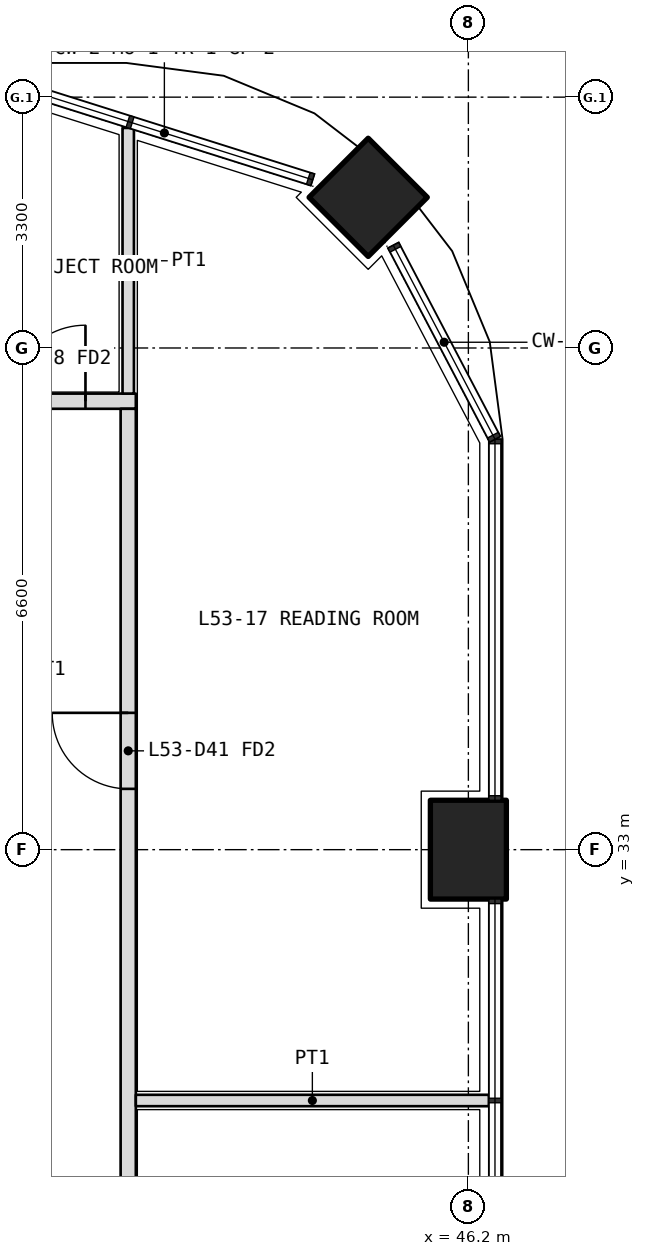
"""IFC4 building model, lengths in metres.
Left out: names, types, materials, properties, quantities, classifications, styles, units other than length and angle.
Written with IfcOpenShell. Run it as: python <this file> out.ifc"""

import sys

from ifc_helpers import new_model, si_unit, direction, frame, frame_2d, origin, origin_2d, place, context, subcontext, project, spatial, rectangle, extrude, element, fill, save


model = new_model("IFC4")
c1 = context("Model", 3, precision=1e-05, world=origin(), true_north=direction((0.0, 1.0)))
c2 = subcontext(c1, "Body", "Model", "MODEL_VIEW")
j1 = project(units=[si_unit("LENGTHUNIT", "METRE"), si_unit("PLANEANGLEUNIT", "RADIAN")], contexts=[c1])
p1 = place(None, origin())
s1 = spatial("IfcSite", under=j1, at=p1, CompositionType="ELEMENT")
p2 = place(p1, origin())
s2 = spatial("IfcBuilding", under=s1, at=p2, CompositionType="ELEMENT")
p3 = place(p2, frame((0.0, 0.0, 233.4)))
s3 = spatial("IfcBuildingStorey", under=s2, at=p3, CompositionType="ELEMENT", Elevation=233.4)
p4 = place(p3, frame((44.882, 41.582, 0.0), z_axis=(0.0, 0.0, 1.0), x_axis=(0.707106781187, 0.707106781187, 0.0)))
e1 = element("IfcColumn", 1, at=p4, inside=s3, PredefinedType="COLUMN", context=c2, shape_type="SweptSolid", body=[
    extrude(rectangle(XDim=1.1, YDim=1.1, at=origin_2d()), origin(), (0.0, 0.0, 1.0), 4.2),
])
p5 = place(p3, frame((46.2, 33.0, 0.0), z_axis=(0.0, 0.0, 1.0), x_axis=(0.0, 1.0, 0.0)))
e2 = element("IfcColumn", 2, at=p5, inside=s3, PredefinedType="COLUMN", context=c2, shape_type="SweptSolid", body=[
    extrude(rectangle(XDim=1.3, YDim=1.0, at=origin_2d()), origin(), (0.0, 0.0, 1.0), 4.2),
])
p6 = place(p3, frame((23.1, 38.9, 0.0), z_axis=(0.0, 0.0, 1.0), x_axis=(1.0, 0.0, 0.0)))
e3 = element("IfcWall", 3, at=p6, inside=s3, PredefinedType="PARTITIONING", context=c2, shape_type="SweptSolid", body=[
    extrude(rectangle(XDim=18.725, YDim=0.2, at=frame_2d((9.362, 0.0))), origin(), (0.0, 0.0, 1.0), 3.0),
])
p7 = place(p6, frame((4.45, 0.0, 0.0)))
e4 = element("IfcOpeningElement", 4, at=p7, cuts=e3, PredefinedType="OPENING", context=c2, shape_type="SweptSolid", body=[
    extrude(rectangle(XDim=1.0, YDim=2.1, at=frame_2d((0.5, 1.05))), frame((0.0, 0.11, 0.0), z_axis=(0.0, -1.0, 0.0), x_axis=(1.0, 0.0, 0.0)), (0.0, 0.0, 1.0), 0.22),
])
p8 = place(p6, frame((12.7, 0.0, 0.0)))
e5 = element("IfcOpeningElement", 5, at=p8, cuts=e3, PredefinedType="OPENING", context=c2, shape_type="SweptSolid", body=[
    extrude(rectangle(XDim=1.0, YDim=2.1, at=frame_2d((0.5, 1.05))), frame((0.0, 0.11, 0.0), z_axis=(0.0, -1.0, 0.0), x_axis=(1.0, 0.0, 0.0)), (0.0, 0.0, 1.0), 0.22),
])
p9 = place(p6, frame((17.062, 0.0, 0.0)))
e6 = element("IfcOpeningElement", 6, at=p9, cuts=e3, PredefinedType="OPENING", context=c2, shape_type="SweptSolid", body=[
    extrude(rectangle(XDim=1.0, YDim=2.1, at=frame_2d((0.5, 1.05))), frame((0.0, 0.11, 0.0), z_axis=(0.0, -1.0, 0.0), x_axis=(1.0, 0.0, 0.0)), (0.0, 0.0, 1.0), 0.22),
])
p10 = place(p3, frame((41.725, 7.4, 0.0), z_axis=(0.0, 0.0, 1.0), x_axis=(0.0, 1.0, 0.0)))
e7 = element("IfcWall", 7, at=p10, inside=s3, PredefinedType="PARTITIONING", context=c2, shape_type="SweptSolid", body=[
    extrude(rectangle(XDim=31.4, YDim=0.2, at=frame_2d((15.7, 0.0))), origin(), (0.0, 0.0, 1.0), 3.0),
])
p11 = place(p10, frame((5.65, 0.0, 0.0)))
e8 = element("IfcOpeningElement", 8, at=p11, cuts=e7, PredefinedType="OPENING", context=c2, shape_type="SweptSolid", body=[
    extrude(rectangle(XDim=1.0, YDim=2.1, at=frame_2d((0.5, 1.05))), frame((0.0, 0.11, 0.0), z_axis=(0.0, -1.0, 0.0), x_axis=(1.0, 0.0, 0.0)), (0.0, 0.0, 1.0), 0.22),
])
p12 = place(p10, frame((13.4, 0.0, 0.0)))
e9 = element("IfcOpeningElement", 9, at=p12, cuts=e7, PredefinedType="OPENING", context=c2, shape_type="SweptSolid", body=[
    extrude(rectangle(XDim=1.0, YDim=2.1, at=frame_2d((0.5, 1.05))), frame((0.0, 0.11, 0.0), z_axis=(0.0, -1.0, 0.0), x_axis=(1.0, 0.0, 0.0)), (0.0, 0.0, 1.0), 0.22),
])
p13 = place(p10, frame((16.75, 0.0, 0.0)))
e10 = element("IfcOpeningElement", 10, at=p13, cuts=e7, PredefinedType="OPENING", context=c2, shape_type="SweptSolid", body=[
    extrude(rectangle(XDim=0.9, YDim=2.1, at=frame_2d((0.45, 1.05))), frame((0.0, 0.11, 0.0), z_axis=(0.0, -1.0, 0.0), x_axis=(1.0, 0.0, 0.0)), (0.0, 0.0, 1.0), 0.22),
])
p14 = place(p10, frame((20.15, 0.0, 0.0)))
e11 = element("IfcOpeningElement", 11, at=p14, cuts=e7, PredefinedType="OPENING", context=c2, shape_type="SweptSolid", body=[
    extrude(rectangle(XDim=1.0, YDim=2.1, at=frame_2d((0.5, 1.05))), frame((0.0, 0.11, 0.0), z_axis=(0.0, -1.0, 0.0), x_axis=(1.0, 0.0, 0.0)), (0.0, 0.0, 1.0), 0.22),
])
p15 = place(p10, frame((26.4, 0.0, 0.0)))
e12 = element("IfcOpeningElement", 12, at=p15, cuts=e7, PredefinedType="OPENING", context=c2, shape_type="SweptSolid", body=[
    extrude(rectangle(XDim=1.0, YDim=2.1, at=frame_2d((0.5, 1.05))), frame((0.0, 0.11, 0.0), z_axis=(0.0, -1.0, 0.0), x_axis=(1.0, 0.0, 0.0)), (0.0, 0.0, 1.0), 0.22),
])
p16 = place(p3, frame((41.725, 42.495, 0.0), z_axis=(0.0, 0.0, 1.0), x_axis=(0.0, -1.0, 0.0)))
e13 = element("IfcWall", 13, at=p16, inside=s3, PredefinedType="PARTITIONING", context=c2, shape_type="SweptSolid", body=[
    extrude(rectangle(XDim=3.495, YDim=0.15, at=frame_2d((1.748, 0.0))), origin(), (0.0, 0.0, 1.0), 2.7),
])
p17 = place(p3, frame((46.47, 29.7, 0.0), z_axis=(0.0, 0.0, 1.0), x_axis=(-1.0, 0.0, 0.0)))
e14 = element("IfcWall", 14, at=p17, inside=s3, PredefinedType="PARTITIONING", context=c2, shape_type="SweptSolid", body=[
    extrude(rectangle(XDim=4.645, YDim=0.15, at=frame_2d((2.323, 0.0))), origin(), (0.0, 0.0, 1.0), 2.7),
])
p18 = place(p15, origin())
e15 = element("IfcDoor", 15, at=p18, inside=s3, OperationType="SINGLE_SWING_RIGHT", PredefinedType="DOOR", context=c2, shape_type="SweptSolid", body=[
    extrude(rectangle(XDim=1.0, YDim=2.1, at=frame_2d((0.5, 1.05))), frame((0.0, 0.025, 0.0), z_axis=(0.0, -1.0, 0.0), x_axis=(1.0, 0.0, 0.0)), (0.0, 0.0, 1.0), 0.05),
])
fill(e12, e15)
p19 = place(p9, origin())
e16 = element("IfcDoor", 16, at=p19, inside=s3, OperationType="SINGLE_SWING_RIGHT", PredefinedType="DOOR", context=c2, shape_type="SweptSolid", body=[
    extrude(rectangle(XDim=1.0, YDim=2.1, at=frame_2d((0.5, 1.05))), frame((0.0, 0.025, 0.0), z_axis=(0.0, -1.0, 0.0), x_axis=(1.0, 0.0, 0.0)), (0.0, 0.0, 1.0), 0.05),
])
fill(e6, e16)
save(model, sys.argv[1])
